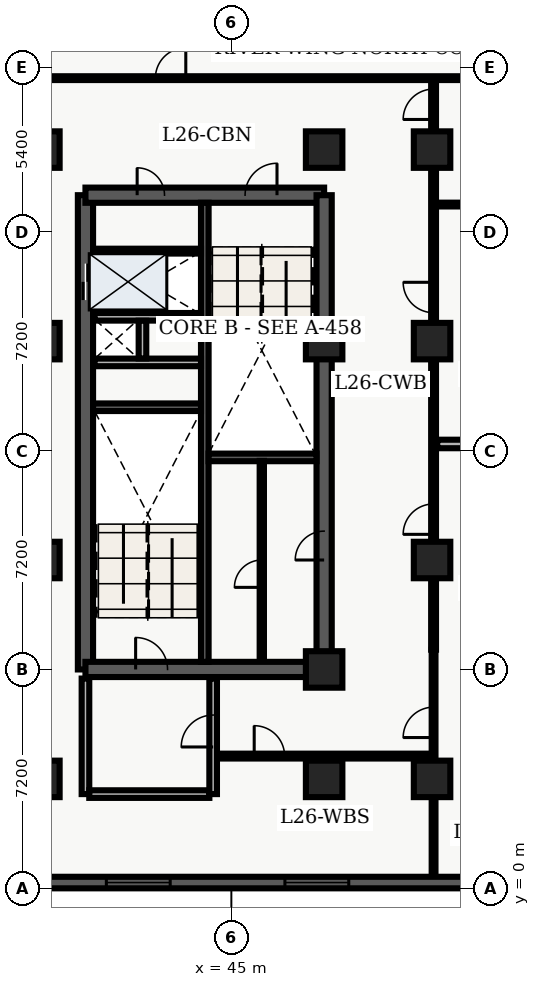
"""IFC4 building model, lengths in metres.
Left out: names, types, materials, properties, quantities, classifications, styles, units other than length and angle.
Written with IfcOpenShell. Run it as: python <this file> out.ifc"""

import sys

from ifc_helpers import new_model, entity, si_unit, converted_unit, direction, frame, origin_with_axes, origin_2d_with_axis, place, context, subcontext, project, spatial, polyline, rectangle, outline, extrude, element, fill, save


model = new_model("IFC4")
c1 = context("Model", 3, precision=1e-05, world=origin_with_axes(), true_north=direction((0.0, 1.0)))
c2 = subcontext(c1, "Body", "Model", "MODEL_VIEW")
j1 = project(units=[si_unit("LENGTHUNIT", "METRE"), converted_unit("PLANEANGLEUNIT", "DEGREE", entity("IfcPlaneAngleMeasure", 0.017), si_unit("PLANEANGLEUNIT", "RADIAN"), dimensions=[0, 0, 0, 0, 0, 0, 0])], contexts=[c1])
p1 = place(None, origin_with_axes())
s1 = spatial("IfcSite", under=j1, at=p1, CompositionType="ELEMENT")
p2 = place(p1, origin_with_axes())
s2 = spatial("IfcBuilding", under=s1, at=p2, CompositionType="ELEMENT")
p3 = place(p2, frame((0.0, 0.0, 108.6), z_axis=(0.0, 0.0, 1.0), x_axis=(1.0, 0.0, 0.0)))
s3 = spatial("IfcBuildingStorey", under=s2, at=p3, CompositionType="ELEMENT", Elevation=108.6)
p4 = place(p3, frame((40.2, 7.2, 0.0), z_axis=(0.0, 0.0, 1.0), x_axis=(0.0, 1.0, 0.0)))
e1 = element("IfcWall", 1, at=p4, inside=s3, PredefinedType="SHEAR", context=c2, shape_type="SweptSolid", body=[
    extrude(outline(polyline([(0.0, -0.25), (15.6, -0.25), (15.6, 0.25), (0.0, 0.25), (0.0, -0.25)])), origin_with_axes(), (0.0, 0.0, 1.0), 3.66),
])
p5 = place(p4, frame((12.75, 0.0, 0.0), z_axis=(0.0, 0.0, 1.0), x_axis=(1.0, 0.0, 0.0)))
e2 = element("IfcOpeningElement", 2, at=p5, cuts=e1, PredefinedType="OPENING", context=c2, shape_type="SweptSolid", body=[
    extrude(rectangle(XDim=1.2, YDim=0.52, at=origin_2d_with_axis()), origin_with_axes(), (0.0, 0.0, 1.0), 2.15),
])
p6 = place(p3, frame((40.2, 7.2, 0.0), z_axis=(0.0, 0.0, 1.0), x_axis=(1.0, 0.0, 0.0)))
e3 = element("IfcWall", 3, at=p6, inside=s3, PredefinedType="SHEAR", context=c2, shape_type="SweptSolid", body=[
    extrude(outline(polyline([(0.0, -0.25), (7.85, -0.25), (7.85, 0.25), (0.0, 0.25), (0.0, -0.25)])), origin_with_axes(), (0.0, 0.0, 1.0), 3.66),
])
p7 = place(p6, frame((2.175, 0.0, 0.0), z_axis=(0.0, 0.0, 1.0), x_axis=(1.0, 0.0, 0.0)))
e4 = element("IfcOpeningElement", 4, at=p7, cuts=e3, PredefinedType="OPENING", context=c2, shape_type="SweptSolid", body=[
    extrude(rectangle(XDim=1.05, YDim=0.52, at=origin_2d_with_axis()), origin_with_axes(), (0.0, 0.0, 1.0), 2.15),
])
p8 = place(p3, frame((40.2, 22.8, 0.0), z_axis=(0.0, 0.0, 1.0), x_axis=(1.0, 0.0, 0.0)))
e5 = element("IfcWall", 5, at=p8, inside=s3, PredefinedType="SHEAR", context=c2, shape_type="SweptSolid", body=[
    extrude(outline(polyline([(0.0, -0.25), (7.85, -0.25), (7.85, 0.25), (0.0, 0.25), (0.0, -0.25)])), origin_with_axes(), (0.0, 0.0, 1.0), 3.66),
])
p9 = place(p8, frame((5.775, 0.0, 0.0), z_axis=(0.0, 0.0, 1.0), x_axis=(1.0, 0.0, 0.0)))
e6 = element("IfcOpeningElement", 6, at=p9, cuts=e5, PredefinedType="OPENING", context=c2, shape_type="SweptSolid", body=[
    extrude(rectangle(XDim=1.05, YDim=0.52, at=origin_2d_with_axis()), origin_with_axes(), (0.0, 0.0, 1.0), 2.15),
])
p10 = place(p8, frame((2.15, 0.0, 0.0), z_axis=(0.0, 0.0, 1.0), x_axis=(1.0, 0.0, 0.0)))
e7 = element("IfcOpeningElement", 7, at=p10, cuts=e5, PredefinedType="OPENING", context=c2, shape_type="SweptSolid", body=[
    extrude(rectangle(XDim=0.9, YDim=0.52, at=origin_2d_with_axis()), origin_with_axes(), (0.0, 0.0, 1.0), 2.15),
])
p11 = place(p3, frame((48.05, 7.2, 0.0), z_axis=(0.0, 0.0, 1.0), x_axis=(0.0, 1.0, 0.0)))
e8 = element("IfcWall", 8, at=p11, inside=s3, PredefinedType="SHEAR", context=c2, shape_type="SweptSolid", body=[
    extrude(outline(polyline([(0.0, -0.25), (15.6, -0.25), (15.6, 0.25), (0.0, 0.25), (0.0, -0.25)])), origin_with_axes(), (0.0, 0.0, 1.0), 3.66),
])
p12 = place(p11, frame((4.075, 0.0, 0.0), z_axis=(0.0, 0.0, 1.0), x_axis=(1.0, 0.0, 0.0)))
e9 = element("IfcOpeningElement", 9, at=p12, cuts=e8, PredefinedType="OPENING", context=c2, shape_type="SweptSolid", body=[
    extrude(rectangle(XDim=0.95, YDim=0.52, at=origin_2d_with_axis()), origin_with_axes(), (0.0, 0.0, 1.0), 2.15),
])
p13 = place(p3, frame((44.125, 7.45, 0.0), z_axis=(0.0, 0.0, 1.0), x_axis=(0.0, 1.0, 0.0)))
e10 = element("IfcWall", 10, at=p13, inside=s3, PredefinedType="SHEAR", context=c2, shape_type="SweptSolid", body=[
    extrude(outline(polyline([(0.0, -0.125), (15.1, -0.125), (15.1, 0.125), (0.0, 0.125), (0.0, -0.125)])), origin_with_axes(), (0.0, 0.0, 1.0), 3.66),
])
for number, where, z_axis, x_axis in (
    (11, (40.45, 15.825, 0.0), (0.0, 0.0, 1.0), (1.0, 0.0, 0.0)),
    (12, (44.25, 14.175, 0.0), (0.0, 0.0, 1.0), (1.0, 0.0, 0.0)),
):
    element("IfcWall", number, at=place(p3, frame(where, z_axis=z_axis, x_axis=x_axis)), inside=s3, PredefinedType="SHEAR", context=c2, shape_type="SweptSolid", body=[
        extrude(outline(polyline([(0.0, -0.125), (3.55, -0.125), (3.55, 0.125), (0.0, 0.125), (0.0, -0.125)])), origin_with_axes(), (0.0, 0.0, 1.0), 3.66),
    ])
for number, where, z_axis, x_axis in (
    (13, (40.5, 17.3, 0.0), (0.0, 0.0, 1.0), (1.0, 0.0, 0.0)),
    (14, (40.5, 18.8, 0.0), (0.0, 0.0, 1.0), (1.0, 0.0, 0.0)),
):
    element("IfcWall", number, at=place(p3, frame(where, z_axis=z_axis, x_axis=x_axis)), inside=s3, PredefinedType="SOLIDWALL", context=c2, shape_type="SweptSolid", body=[
        extrude(outline(polyline([(0.0, -0.125), (3.5, -0.125), (3.5, 0.125), (0.0, 0.125), (0.0, -0.125)])), origin_with_axes(), (0.0, 0.0, 1.0), 2.7),
    ])
p14 = place(p3, frame((42.075, 17.43, 0.0), z_axis=(0.0, 0.0, 1.0), x_axis=(0.0, 1.0, 0.0)))
e15 = element("IfcWall", 15, at=p14, inside=s3, PredefinedType="SOLIDWALL", context=c2, shape_type="SweptSolid", body=[
    extrude(outline(polyline([(0.0, -0.125), (1.24, -0.125), (1.24, 0.125), (0.0, 0.125), (0.0, -0.125)])), origin_with_axes(), (0.0, 0.0, 1.0), 2.7),
])
p15 = place(p3, frame((40.2, 3.1, 0.0), z_axis=(0.0, 0.0, 1.0), x_axis=(0.0, 1.0, 0.0)))
e16 = element("IfcWall", 16, at=p15, inside=s3, PredefinedType="SOLIDWALL", context=c2, shape_type="SweptSolid", body=[
    extrude(outline(polyline([(0.0, -0.125), (3.8, -0.125), (3.8, 0.125), (0.0, 0.125), (0.0, -0.125)])), origin_with_axes(), (0.0, 0.0, 1.0), 2.7),
])
p16 = place(p3, frame((40.325, 3.1, 0.0), z_axis=(0.0, 0.0, 1.0), x_axis=(1.0, 0.0, 0.0)))
e17 = element("IfcWall", 17, at=p16, inside=s3, PredefinedType="SOLIDWALL", context=c2, shape_type="SweptSolid", body=[
    extrude(outline(polyline([(0.0, -0.125), (3.95, -0.125), (3.95, 0.125), (0.0, 0.125), (0.0, -0.125)])), origin_with_axes(), (0.0, 0.0, 1.0), 2.7),
])
p17 = place(p3, frame((44.4, 3.1, 0.0), z_axis=(0.0, 0.0, 1.0), x_axis=(0.0, 1.0, 0.0)))
e18 = element("IfcWall", 18, at=p17, inside=s3, PredefinedType="SOLIDWALL", context=c2, shape_type="SweptSolid", body=[
    extrude(outline(polyline([(0.0, -0.125), (3.8, -0.125), (3.8, 0.125), (0.0, 0.125), (0.0, -0.125)])), origin_with_axes(), (0.0, 0.0, 1.0), 2.7),
])
p18 = place(p17, frame((2.075, 0.0, 0.0), z_axis=(0.0, 0.0, 1.0), x_axis=(1.0, 0.0, 0.0)))
e19 = element("IfcOpeningElement", 19, at=p18, cuts=e18, PredefinedType="OPENING", context=c2, shape_type="SweptSolid", body=[
    extrude(rectangle(XDim=1.05, YDim=0.27, at=origin_2d_with_axis()), origin_with_axes(), (0.0, 0.0, 1.0), 2.15),
])
for number, where, z_axis, x_axis in (
    (20, (38.75, 3.6, 0.0), (0.0, 0.0, 1.0), (1.0, 0.0, 0.0)),
    (21, (38.75, 10.8, 0.0), (0.0, 0.0, 1.0), (1.0, 0.0, 0.0)),
    (22, (38.75, 18.0, 0.0), (0.0, 0.0, 1.0), (1.0, 0.0, 0.0)),
    (23, (38.75, 24.3, 0.0), (0.0, 0.0, 1.0), (1.0, 0.0, 0.0)),
    (24, (48.05, 3.6, 0.0), (0.0, 0.0, 1.0), (1.0, 0.0, 0.0)),
    (25, (48.05, 7.2, 0.0), (0.0, 0.0, 1.0), (1.0, 0.0, 0.0)),
    (26, (48.05, 18.0, 0.0), (0.0, 0.0, 1.0), (1.0, 0.0, 0.0)),
    (27, (48.05, 24.3, 0.0), (0.0, 0.0, 1.0), (1.0, 0.0, 0.0)),
    (28, (51.6, 3.6, 0.0), (0.0, 0.0, 1.0), (1.0, 0.0, 0.0)),
    (29, (51.6, 10.8, 0.0), (0.0, 0.0, 1.0), (1.0, 0.0, 0.0)),
    (30, (51.6, 18.0, 0.0), (0.0, 0.0, 1.0), (1.0, 0.0, 0.0)),
    (31, (51.6, 24.3, 0.0), (0.0, 0.0, 1.0), (1.0, 0.0, 0.0)),
):
    element("IfcColumn", number, at=place(p3, frame(where, z_axis=z_axis, x_axis=x_axis)), inside=s3, PredefinedType="COLUMN", context=c2, shape_type="SweptSolid", body=[
        extrude(rectangle(XDim=1.2, YDim=1.2, at=origin_2d_with_axis()), origin_with_axes(), (0.0, 0.0, 1.0), 3.9),
    ])
p19 = place(p3, frame((40.5, 20.96, 0.0), z_axis=(0.0, 0.0, 1.0), x_axis=(1.0, 0.0, 0.0)))
e32 = element("IfcWall", 32, at=p19, inside=s3, PredefinedType="PARTITIONING", context=c2, shape_type="SweptSolid", body=[
    extrude(outline(polyline([(0.0, -0.08), (3.5, -0.08), (3.5, 0.08), (0.0, 0.08), (0.0, -0.08)])), origin_with_axes(), (0.0, 0.0, 1.0), 2.7),
])
p20 = place(p3, frame((46.0, 7.5, 0.0), z_axis=(0.0, 0.0, 1.0), x_axis=(0.0, 1.0, 0.0)))
e33 = element("IfcWall", 33, at=p20, inside=s3, PredefinedType="PARTITIONING", context=c2, shape_type="SweptSolid", body=[
    extrude(outline(polyline([(0.0, -0.07), (6.56, -0.07), (6.56, 0.07), (0.0, 0.07), (0.0, -0.07)])), origin_with_axes(), (0.0, 0.0, 1.0), 2.7),
])
p21 = place(p20, frame((2.85, 0.0, 0.0), z_axis=(0.0, 0.0, 1.0), x_axis=(1.0, 0.0, 0.0)))
e34 = element("IfcOpeningElement", 34, at=p21, cuts=e33, PredefinedType="OPENING", context=c2, shape_type="SweptSolid", body=[
    extrude(rectangle(XDim=0.9, YDim=0.16, at=origin_2d_with_axis()), origin_with_axes(), (0.0, 0.0, 1.0), 2.15),
])
p22 = place(p3, frame((51.65, 7.85, 0.0), z_axis=(0.0, 0.0, 1.0), x_axis=(0.0, 1.0, 0.0)))
e35 = element("IfcWall", 35, at=p22, inside=s3, PredefinedType="PARTITIONING", context=c2, shape_type="SweptSolid", body=[
    extrude(outline(polyline([(0.0, -0.08), (18.8, -0.08), (18.8, 0.08), (0.0, 0.08), (0.0, -0.08)])), origin_with_axes(), (0.0, 0.0, 1.0), 2.7),
])
p23 = place(p22, frame((4.294, 0.0, 0.0), z_axis=(0.0, 0.0, 1.0), x_axis=(1.0, 0.0, 0.0)))
e36 = element("IfcOpeningElement", 36, at=p23, cuts=e35, PredefinedType="OPENING", context=c2, shape_type="SweptSolid", body=[
    extrude(rectangle(XDim=1.0, YDim=0.18, at=origin_2d_with_axis()), origin_with_axes(), (0.0, 0.0, 1.0), 2.15),
])
p24 = place(p22, frame((11.585, 0.0, 0.0), z_axis=(0.0, 0.0, 1.0), x_axis=(1.0, 0.0, 0.0)))
e37 = element("IfcOpeningElement", 37, at=p24, cuts=e35, PredefinedType="OPENING", context=c2, shape_type="SweptSolid", body=[
    extrude(rectangle(XDim=1.0, YDim=0.18, at=origin_2d_with_axis()), origin_with_axes(), (0.0, 0.0, 1.0), 2.15),
])
p25 = place(p22, frame((17.941, 0.0, 0.0), z_axis=(0.0, 0.0, 1.0), x_axis=(1.0, 0.0, 0.0)))
e38 = element("IfcOpeningElement", 38, at=p25, cuts=e35, PredefinedType="OPENING", context=c2, shape_type="SweptSolid", body=[
    extrude(rectangle(XDim=1.0, YDim=0.18, at=origin_2d_with_axis()), origin_with_axes(), (0.0, 0.0, 1.0), 2.15),
])
p26 = place(p3, frame((38.76, 26.65, 0.0), z_axis=(0.0, 0.0, 1.0), x_axis=(1.0, 0.0, 0.0)))
e39 = element("IfcWall", 39, at=p26, inside=s3, PredefinedType="PARTITIONING", context=c2, shape_type="SweptSolid", body=[
    extrude(outline(polyline([(0.0, -0.062), (20.88, -0.062), (20.88, 0.062), (0.0, 0.062), (0.0, -0.062)])), origin_with_axes(), (0.0, 0.0, 1.0), 2.7),
])
p27 = place(p26, frame((4.24, 0.0, 0.0), z_axis=(0.0, 0.0, 1.0), x_axis=(1.0, 0.0, 0.0)))
e40 = element("IfcOpeningElement", 40, at=p27, cuts=e39, PredefinedType="OPENING", context=c2, shape_type="SweptSolid", body=[
    extrude(rectangle(XDim=1.0, YDim=0.145, at=origin_2d_with_axis()), origin_with_axes(), (0.0, 0.0, 1.0), 2.15),
])
p28 = place(p3, frame((44.55, 4.35, 0.0), z_axis=(0.0, 0.0, 1.0), x_axis=(1.0, 0.0, 0.0)))
e41 = element("IfcWall", 41, at=p28, inside=s3, PredefinedType="PARTITIONING", context=c2, shape_type="SweptSolid", body=[
    extrude(outline(polyline([(0.0, -0.08), (7.1, -0.08), (7.1, 0.08), (0.0, 0.08), (0.0, -0.08)])), origin_with_axes(), (0.0, 0.0, 1.0), 2.7),
])
p29 = place(p28, frame((1.7, 0.0, 0.0), z_axis=(0.0, 0.0, 1.0), x_axis=(1.0, 0.0, 0.0)))
e42 = element("IfcOpeningElement", 42, at=p29, cuts=e41, PredefinedType="OPENING", context=c2, shape_type="SweptSolid", body=[
    extrude(rectangle(XDim=1.0, YDim=0.18, at=origin_2d_with_axis()), origin_with_axes(), (0.0, 0.0, 1.0), 2.15),
])
p30 = place(p3, frame((51.65, 0.36, 0.0), z_axis=(0.0, 0.0, 1.0), x_axis=(0.0, 1.0, 0.0)))
e43 = element("IfcWall", 43, at=p30, inside=s3, PredefinedType="PARTITIONING", context=c2, shape_type="SweptSolid", body=[
    extrude(outline(polyline([(0.0, -0.062), (7.49, -0.062), (7.49, 0.062), (0.0, 0.062), (0.0, -0.062)])), origin_with_axes(), (0.0, 0.0, 1.0), 2.7),
])
p31 = place(p30, frame((5.1, 0.0, 0.0), z_axis=(0.0, 0.0, 1.0), x_axis=(1.0, 0.0, 0.0)))
e44 = element("IfcOpeningElement", 44, at=p31, cuts=e43, PredefinedType="OPENING", context=c2, shape_type="SweptSolid", body=[
    extrude(rectangle(XDim=1.0, YDim=0.145, at=origin_2d_with_axis()), origin_with_axes(), (0.0, 0.0, 1.0), 2.15),
])
p32 = place(p3, frame((51.77, 14.617, 0.0), z_axis=(0.0, 0.0, 1.0), x_axis=(1.0, 0.0, 0.0)))
e45 = element("IfcWall", 45, at=p32, inside=s3, PredefinedType="PARTITIONING", context=c2, shape_type="SweptSolid", body=[
    extrude(outline(polyline([(0.0, -0.14), (7.855, -0.14), (7.855, 0.14), (0.0, 0.14), (0.0, -0.14)])), origin_with_axes(), (0.0, 0.0, 1.0), 2.7),
])
p33 = place(p3, frame((51.77, 22.492, 0.0), z_axis=(0.0, 0.0, 1.0), x_axis=(1.0, 0.0, 0.0)))
e46 = element("IfcWall", 46, at=p33, inside=s3, PredefinedType="PARTITIONING", context=c2, shape_type="SweptSolid", body=[
    extrude(outline(polyline([(0.0, -0.062), (7.855, -0.062), (7.855, 0.062), (0.0, 0.062), (0.0, -0.062)])), origin_with_axes(), (0.0, 0.0, 1.0), 2.7),
])
p34 = place(p3, frame((57.22, 0.19, 0.0), z_axis=(0.0, 0.0, 1.0), x_axis=(-1.0, 0.0, 0.0)))
e47 = element("IfcWall", 47, at=p34, inside=s3, PredefinedType="SOLIDWALL", context=c2, shape_type="SweptSolid", body=[
    extrude(outline(polyline([(0.0, -0.19), (18.82, -0.19), (18.82, 0.19), (0.0, 0.19), (0.0, -0.19)])), origin_with_axes(), (0.0, 0.0, 1.0), 3.66),
])
p35 = place(p34, frame((3.537, 0.0, 0.45), z_axis=(0.0, 0.0, 1.0), x_axis=(1.0, 0.0, 0.0)))
e48 = element("IfcOpeningElement", 48, at=p35, cuts=e47, PredefinedType="OPENING", context=c2, shape_type="SweptSolid", body=[
    extrude(rectangle(XDim=2.1, YDim=0.4, at=origin_2d_with_axis()), origin_with_axes(), (0.0, 0.0, 1.0), 2.2),
])
p36 = place(p34, frame((9.41, 0.0, 0.45), z_axis=(0.0, 0.0, 1.0), x_axis=(1.0, 0.0, 0.0)))
e49 = element("IfcOpeningElement", 49, at=p36, cuts=e47, PredefinedType="OPENING", context=c2, shape_type="SweptSolid", body=[
    extrude(rectangle(XDim=2.1, YDim=0.4, at=origin_2d_with_axis()), origin_with_axes(), (0.0, 0.0, 1.0), 2.2),
])
p37 = place(p34, frame((15.283, 0.0, 0.45), z_axis=(0.0, 0.0, 1.0), x_axis=(1.0, 0.0, 0.0)))
e50 = element("IfcOpeningElement", 50, at=p37, cuts=e47, PredefinedType="OPENING", context=c2, shape_type="SweptSolid", body=[
    extrude(rectangle(XDim=2.1, YDim=0.4, at=origin_2d_with_axis()), origin_with_axes(), (0.0, 0.0, 1.0), 2.2),
])
p38 = place(p4, frame((12.75, 0.0, 0.0), z_axis=(0.0, 0.0, 1.0), x_axis=(1.0, 0.0, 0.0)))
e51 = element("IfcDoor", 51, at=p38, inside=s3, OperationType="DOUBLE_DOOR_SLIDING", PredefinedType="DOOR", context=c2, shape_type="SweptSolid", body=[
    extrude(rectangle(XDim=1.2, YDim=0.09, at=origin_2d_with_axis()), origin_with_axes(), (0.0, 0.0, 1.0), 2.15),
])
fill(e2, e51)
p39 = place(p6, frame((2.175, 0.0, 0.0), z_axis=(0.0, 0.0, 1.0), x_axis=(1.0, 0.0, 0.0)))
e52 = element("IfcDoor", 52, at=p39, inside=s3, OperationType="SINGLE_SWING_LEFT", PredefinedType="DOOR", context=c2, shape_type="SweptSolid", body=[
    extrude(rectangle(XDim=1.05, YDim=0.09, at=origin_2d_with_axis()), origin_with_axes(), (0.0, 0.0, 1.0), 2.15),
])
fill(e4, e52)
p40 = place(p8, frame((5.775, 0.0, 0.0), z_axis=(0.0, 0.0, 1.0), x_axis=(1.0, 0.0, 0.0)))
e53 = element("IfcDoor", 53, at=p40, inside=s3, OperationType="SINGLE_SWING_RIGHT", PredefinedType="DOOR", context=c2, shape_type="SweptSolid", body=[
    extrude(rectangle(XDim=1.05, YDim=0.09, at=origin_2d_with_axis()), origin_with_axes(), (0.0, 0.0, 1.0), 2.15),
])
fill(e6, e53)
p41 = place(p17, frame((2.075, 0.0, 0.0), z_axis=(0.0, 0.0, 1.0), x_axis=(1.0, 0.0, 0.0)))
e54 = element("IfcDoor", 54, at=p41, inside=s3, OperationType="SINGLE_SWING_LEFT", PredefinedType="DOOR", context=c2, shape_type="SweptSolid", body=[
    extrude(rectangle(XDim=1.05, YDim=0.09, at=origin_2d_with_axis()), origin_with_axes(), (0.0, 0.0, 1.0), 2.15),
])
fill(e19, e54)
p42 = place(p8, frame((2.15, 0.0, 0.0), z_axis=(0.0, 0.0, 1.0), x_axis=(1.0, 0.0, 0.0)))
e55 = element("IfcDoor", 55, at=p42, inside=s3, OperationType="SINGLE_SWING_LEFT", PredefinedType="DOOR", context=c2, shape_type="SweptSolid", body=[
    extrude(rectangle(XDim=0.9, YDim=0.09, at=origin_2d_with_axis()), origin_with_axes(), (0.0, 0.0, 1.0), 2.15),
])
fill(e7, e55)
p43 = place(p20, frame((2.85, 0.0, 0.0), z_axis=(0.0, 0.0, 1.0), x_axis=(1.0, 0.0, 0.0)))
e56 = element("IfcDoor", 56, at=p43, inside=s3, OperationType="SINGLE_SWING_LEFT", PredefinedType="DOOR", context=c2, shape_type="SweptSolid", body=[
    extrude(rectangle(XDim=0.9, YDim=0.084, at=origin_2d_with_axis()), origin_with_axes(), (0.0, 0.0, 1.0), 2.15),
])
fill(e34, e56)
p44 = place(p11, frame((4.075, 0.0, 0.0), z_axis=(0.0, 0.0, 1.0), x_axis=(1.0, 0.0, 0.0)))
e57 = element("IfcDoor", 57, at=p44, inside=s3, OperationType="SINGLE_SWING_LEFT", PredefinedType="DOOR", context=c2, shape_type="SweptSolid", body=[
    extrude(rectangle(XDim=0.95, YDim=0.09, at=origin_2d_with_axis()), origin_with_axes(), (0.0, 0.0, 1.0), 2.15),
])
fill(e9, e57)
p45 = place(p28, frame((1.7, 0.0, 0.0), z_axis=(0.0, 0.0, 1.0), x_axis=(1.0, 0.0, 0.0)))
e58 = element("IfcDoor", 58, at=p45, inside=s3, OperationType="SINGLE_SWING_LEFT", PredefinedType="DOOR", context=c2, shape_type="SweptSolid", body=[
    extrude(rectangle(XDim=1.0, YDim=0.09, at=origin_2d_with_axis()), origin_with_axes(), (0.0, 0.0, 1.0), 2.15),
])
fill(e42, e58)
p46 = place(p30, frame((5.1, 0.0, 0.0), z_axis=(0.0, 0.0, 1.0), x_axis=(1.0, 0.0, 0.0)))
e59 = element("IfcDoor", 59, at=p46, inside=s3, OperationType="SINGLE_SWING_LEFT", PredefinedType="DOOR", context=c2, shape_type="SweptSolid", body=[
    extrude(rectangle(XDim=1.0, YDim=0.075, at=origin_2d_with_axis()), origin_with_axes(), (0.0, 0.0, 1.0), 2.15),
])
fill(e44, e59)
p47 = place(p26, frame((4.24, 0.0, 0.0), z_axis=(0.0, 0.0, 1.0), x_axis=(1.0, 0.0, 0.0)))
e60 = element("IfcDoor", 60, at=p47, inside=s3, OperationType="SINGLE_SWING_RIGHT", PredefinedType="DOOR", context=c2, shape_type="SweptSolid", body=[
    extrude(rectangle(XDim=1.0, YDim=0.075, at=origin_2d_with_axis()), origin_with_axes(), (0.0, 0.0, 1.0), 2.15),
])
fill(e40, e60)
p48 = place(p22, frame((4.294, 0.0, 0.0), z_axis=(0.0, 0.0, 1.0), x_axis=(1.0, 0.0, 0.0)))
e61 = element("IfcDoor", 61, at=p48, inside=s3, OperationType="SINGLE_SWING_LEFT", PredefinedType="DOOR", context=c2, shape_type="SweptSolid", body=[
    extrude(rectangle(XDim=1.0, YDim=0.09, at=origin_2d_with_axis()), origin_with_axes(), (0.0, 0.0, 1.0), 2.15),
])
fill(e36, e61)
p49 = place(p22, frame((11.585, 0.0, 0.0), z_axis=(0.0, 0.0, 1.0), x_axis=(1.0, 0.0, 0.0)))
e62 = element("IfcDoor", 62, at=p49, inside=s3, OperationType="SINGLE_SWING_RIGHT", PredefinedType="DOOR", context=c2, shape_type="SweptSolid", body=[
    extrude(rectangle(XDim=1.0, YDim=0.09, at=origin_2d_with_axis()), origin_with_axes(), (0.0, 0.0, 1.0), 2.15),
])
fill(e37, e62)
p50 = place(p22, frame((17.941, 0.0, 0.0), z_axis=(0.0, 0.0, 1.0), x_axis=(1.0, 0.0, 0.0)))
e63 = element("IfcDoor", 63, at=p50, inside=s3, OperationType="SINGLE_SWING_LEFT", PredefinedType="DOOR", context=c2, shape_type="SweptSolid", body=[
    extrude(rectangle(XDim=1.0, YDim=0.09, at=origin_2d_with_axis()), origin_with_axes(), (0.0, 0.0, 1.0), 2.15),
])
fill(e38, e63)
p51 = place(p34, frame((9.41, 0.0, 0.45), z_axis=(0.0, 0.0, 1.0), x_axis=(1.0, 0.0, 0.0)))
e64 = element("IfcWindow", 64, at=p51, inside=s3, PredefinedType="WINDOW", context=c2, shape_type="SweptSolid", body=[
    extrude(rectangle(XDim=2.1, YDim=0.09, at=origin_2d_with_axis()), origin_with_axes(), (0.0, 0.0, 1.0), 2.2),
])
fill(e49, e64)
p52 = place(p34, frame((15.283, 0.0, 0.45), z_axis=(0.0, 0.0, 1.0), x_axis=(1.0, 0.0, 0.0)))
e65 = element("IfcWindow", 65, at=p52, inside=s3, PredefinedType="WINDOW", context=c2, shape_type="SweptSolid", body=[
    extrude(rectangle(XDim=2.1, YDim=0.09, at=origin_2d_with_axis()), origin_with_axes(), (0.0, 0.0, 1.0), 2.2),
])
fill(e50, e65)
save(model, sys.argv[1])
